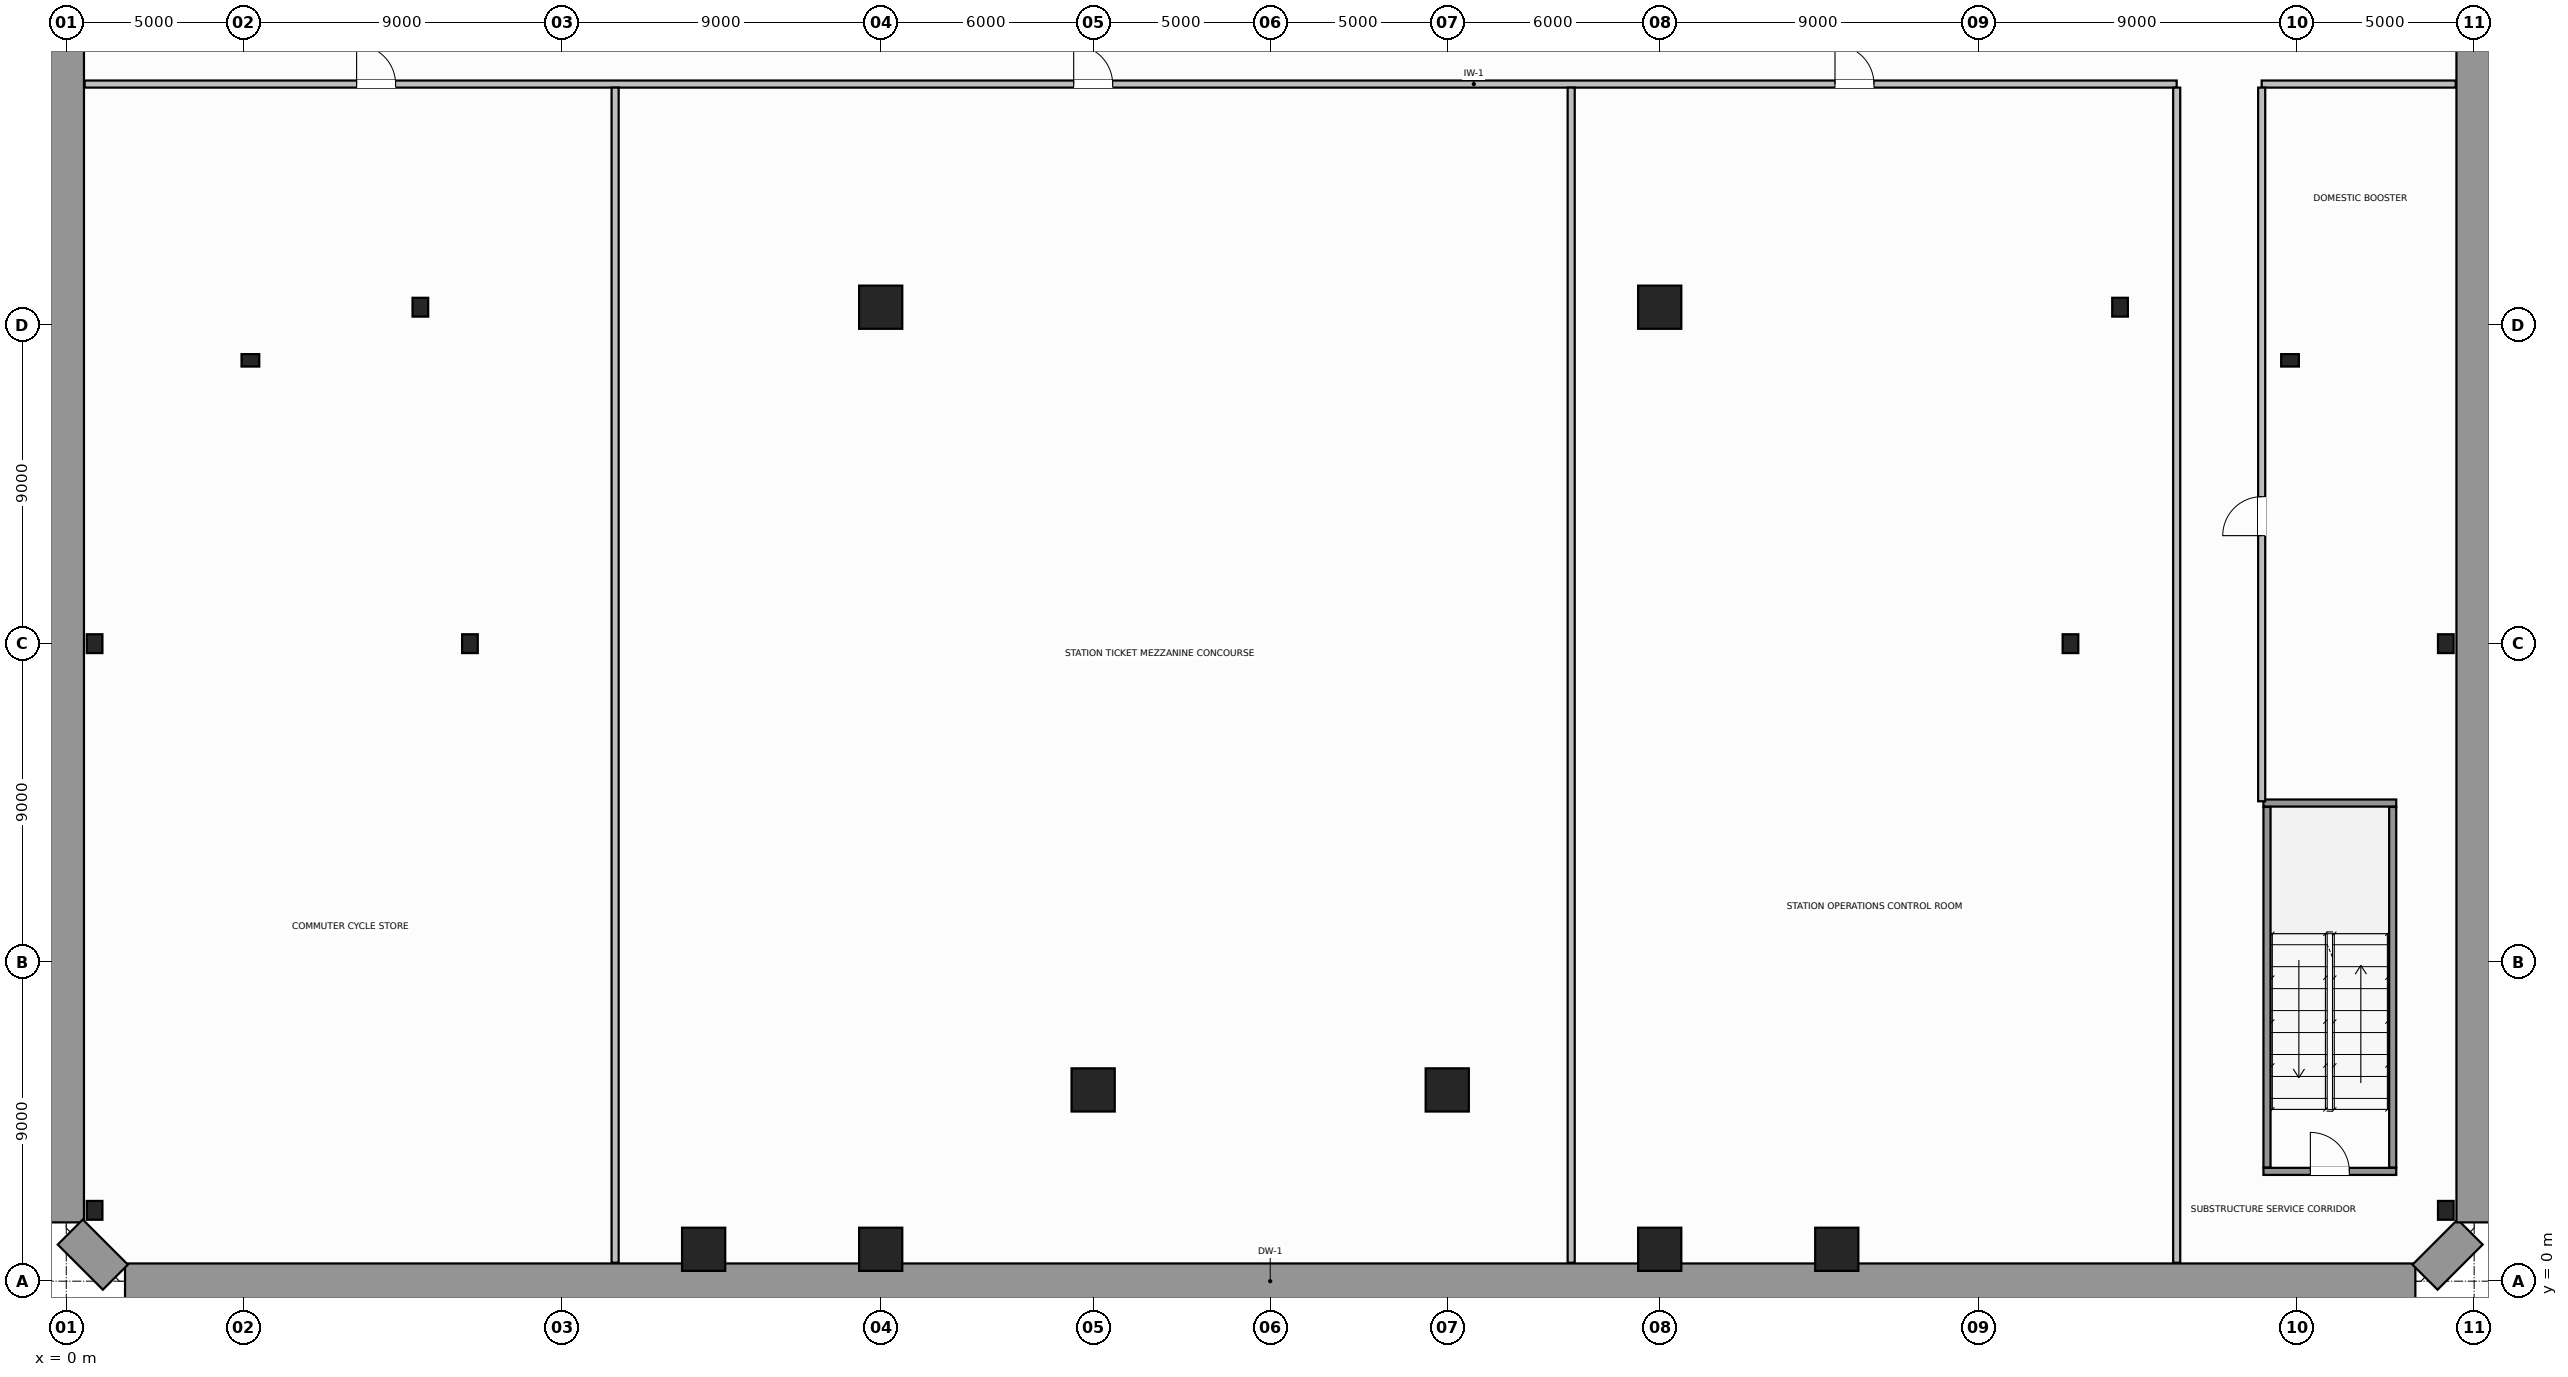
"""IFC4 building model, lengths in metres.
Left out: names, types, materials, properties, quantities, classifications, styles, units other than length and angle.
Written with IfcOpenShell. Run it as: python <this file> out.ifc"""

import sys

from ifc_helpers import new_model, si_unit, direction, frame, frame_2d, origin, origin_2d, place, context, subcontext, project, spatial, rectangle, hollow_circle, i_section, extrude, source, transform, mapped, element, fill, save


model = new_model("IFC4")
c1 = context("Model", 3, precision=1e-05, world=origin(), true_north=direction((0.0, 1.0)))
c2 = subcontext(c1, "Body", "Model", "MODEL_VIEW")
j1 = project(units=[si_unit("LENGTHUNIT", "METRE"), si_unit("PLANEANGLEUNIT", "RADIAN")], contexts=[c1])
p1 = place(None, origin())
s1 = spatial("IfcSite", under=j1, at=p1, CompositionType="ELEMENT")
p2 = place(p1, origin())
s2 = spatial("IfcBuilding", under=s1, at=p2, CompositionType="ELEMENT")
p3 = place(p2, frame((0.0, 0.0, -5.2)))
s3 = spatial("IfcBuildingStorey", under=s2, at=p3, CompositionType="ELEMENT", Elevation=-5.2)
m1 = source(origin(), c2, "Body", "SweptSolid", [
    extrude(hollow_circle(Radius=0.61, WallThickness=0.05, at=origin_2d()), origin(), (0.0, 0.0, 1.0), 5.2),
])
for number, where, z_axis, x_axis in (
    (1, (18.0, 0.9, 0.0), (0.0, 0.0, 1.0), (1.0, 0.0, 0.0)),
    (2, (23.0, 0.9, 0.0), (0.0, 0.0, 1.0), (1.0, 0.0, 0.0)),
    (3, (29.0, 5.4, 0.0), (0.0, 0.0, 1.0), (1.0, 0.0, 0.0)),
    (4, (39.0, 5.4, 0.0), (0.0, 0.0, 1.0), (1.0, 0.0, 0.0)),
    (5, (45.0, 0.9, 0.0), (0.0, 0.0, 1.0), (1.0, 0.0, 0.0)),
    (6, (50.0, 0.9, 0.0), (0.0, 0.0, 1.0), (1.0, 0.0, 0.0)),
):
    element("IfcColumn", number, at=place(p3, frame(where, z_axis=z_axis, x_axis=x_axis)), inside=s3, PredefinedType="COLUMN", context=c2, shape_type="MappedRepresentation", body=[
        mapped(m1, transform((0.0, 0.0, 0.0), scale=1.0)),
    ])
m2 = source(origin(), c2, "Body", "SweptSolid", [
    extrude(i_section(OverallWidth=0.442, OverallDepth=0.531, WebThickness=0.065, FlangeThickness=0.076, FilletRadius=0.015, at=origin_2d()), origin(), (0.0, 0.0, 1.0), 5.2),
])
for number, where, z_axis, x_axis in (
    (7, (0.8, 2.0, 0.0), (0.0, 0.0, 1.0), (1.0, 0.0, 0.0)),
    (8, (0.8, 18.0, 0.0), (0.0, 0.0, 1.0), (1.0, 0.0, 0.0)),
    (9, (67.2, 2.0, 0.0), (0.0, 0.0, 1.0), (1.0, 0.0, 0.0)),
    (10, (67.2, 18.0, 0.0), (0.0, 0.0, 1.0), (1.0, 0.0, 0.0)),
    (11, (10.0, 27.5, 0.0), (0.0, 0.0, 1.0), (1.0, 0.0, 0.0)),
    (12, (11.4, 18.0, 0.0), (0.0, 0.0, 1.0), (1.0, 0.0, 0.0)),
    (13, (58.0, 27.5, 0.0), (0.0, 0.0, 1.0), (1.0, 0.0, 0.0)),
    (14, (56.6, 18.0, 0.0), (0.0, 0.0, 1.0), (1.0, 0.0, 0.0)),
):
    element("IfcColumn", number, at=place(p3, frame(where, z_axis=z_axis, x_axis=x_axis)), inside=s3, PredefinedType="COLUMN", context=c2, shape_type="MappedRepresentation", body=[
        mapped(m2, transform((0.0, 0.0, 0.0), scale=1.0)),
    ])
for number, where, z_axis, x_axis in (
    (15, (23.0, 27.5, 0.0), (0.0, 0.0, 1.0), (1.0, 0.0, 0.0)),
    (16, (45.0, 27.5, 0.0), (0.0, 0.0, 1.0), (1.0, 0.0, 0.0)),
):
    element("IfcColumn", number, at=place(p3, frame(where, z_axis=z_axis, x_axis=x_axis)), inside=s3, PredefinedType="COLUMN", context=c2, shape_type="MappedRepresentation", body=[
        mapped(m1, transform((0.0, 0.0, 0.0), scale=1.0)),
    ])
m3 = source(origin(), c2, "Body", "SweptSolid", [
    extrude(rectangle(XDim=0.5, YDim=0.35, at=origin_2d()), origin(), (0.0, 0.0, 1.0), 4.88),
])
for number, where, z_axis, x_axis in (
    (17, (5.2, 26.0, 0.0), (0.0, 0.0, 1.0), (1.0, 0.0, 0.0)),
    (18, (62.8, 26.0, 0.0), (0.0, 0.0, 1.0), (1.0, 0.0, 0.0)),
):
    element("IfcColumn", number, at=place(p3, frame(where, z_axis=z_axis, x_axis=x_axis)), inside=s3, PredefinedType="PILASTER", context=c2, shape_type="MappedRepresentation", body=[
        mapped(m3, transform((0.0, 0.0, 0.0), scale=1.0)),
    ])
p4 = place(p3, frame((1.66, 0.0, 0.0), z_axis=(0.0, 0.0, 1.0), x_axis=(1.0, 0.0, 0.0)))
e19 = element("IfcWall", 19, at=p4, inside=s3, PredefinedType="STANDARD", context=c2, shape_type="SweptSolid", body=[
    extrude(rectangle(XDim=64.68, YDim=1.0, at=frame_2d((32.34, 0.0))), origin(), (0.0, 0.0, 1.0), 5.2),
])
p5 = place(p3, frame((66.613, 0.113, 0.0), z_axis=(0.0, 0.0, 1.0), x_axis=(0.707106781187, 0.707106781187, 0.0)))
e20 = element("IfcWall", 20, at=p5, inside=s3, PredefinedType="STANDARD", context=c2, shape_type="SweptSolid", body=[
    extrude(rectangle(XDim=1.802, YDim=1.0, at=frame_2d((0.901, 0.0))), origin(), (0.0, 0.0, 1.0), 5.2),
])
for number, where, z_axis, x_axis in (
    (21, (68.0, 1.66, 0.0), (0.0, 0.0, 1.0), (0.0, 1.0, 0.0)),
    (22, (0.0, 50.34, 0.0), (0.0, 0.0, 1.0), (0.0, -1.0, 0.0)),
):
    element("IfcWall", number, at=place(p3, frame(where, z_axis=z_axis, x_axis=x_axis)), inside=s3, PredefinedType="STANDARD", context=c2, shape_type="SweptSolid", body=[
        extrude(rectangle(XDim=48.68, YDim=1.0, at=frame_2d((24.34, 0.0))), origin(), (0.0, 0.0, 1.0), 5.2),
    ])
p6 = place(p3, frame((0.113, 1.387, 0.0), z_axis=(0.0, 0.0, 1.0), x_axis=(0.707106781187, -0.707106781187, 0.0)))
e23 = element("IfcWall", 23, at=p6, inside=s3, PredefinedType="STANDARD", context=c2, shape_type="SweptSolid", body=[
    extrude(rectangle(XDim=1.802, YDim=1.0, at=frame_2d((0.901, 0.0))), origin(), (0.0, 0.0, 1.0), 5.2),
])
p7 = place(p3, frame((62.05, 3.1, 0.0), z_axis=(0.0, 0.0, 1.0), x_axis=(1.0, 0.0, 0.0)))
e24 = element("IfcWall", 24, at=p7, inside=s3, PredefinedType="SOLIDWALL", context=c2, shape_type="SweptSolid", body=[
    extrude(rectangle(XDim=3.75, YDim=0.2, at=frame_2d((1.875, 0.0))), origin(), (0.0, 0.0, 1.0), 5.2),
])
p8 = place(p7, frame((1.325, 0.0, 0.0)))
e25 = element("IfcOpeningElement", 25, at=p8, cuts=e24, PredefinedType="OPENING", context=c2, shape_type="SweptSolid", body=[
    extrude(rectangle(XDim=1.1, YDim=2.15, at=frame_2d((0.55, 1.075))), frame((0.0, 0.11, 0.0), z_axis=(0.0, -1.0, 0.0), x_axis=(1.0, 0.0, 0.0)), (0.0, 0.0, 1.0), 0.22),
])
p9 = place(p3, frame((62.05, 13.5, 0.0), z_axis=(0.0, 0.0, 1.0), x_axis=(1.0, 0.0, 0.0)))
e26 = element("IfcWall", 26, at=p9, inside=s3, PredefinedType="SOLIDWALL", context=c2, shape_type="SweptSolid", body=[
    extrude(rectangle(XDim=3.75, YDim=0.2, at=frame_2d((1.875, 0.0))), origin(), (0.0, 0.0, 1.0), 5.2),
])
for number, where, z_axis, x_axis in (
    (27, (62.15, 3.21, 0.0), (0.0, 0.0, 1.0), (0.0, 1.0, 0.0)),
    (28, (65.7, 3.21, 0.0), (0.0, 0.0, 1.0), (0.0, 1.0, 0.0)),
):
    element("IfcWall", number, at=place(p3, frame(where, z_axis=z_axis, x_axis=x_axis)), inside=s3, PredefinedType="SOLIDWALL", context=c2, shape_type="SweptSolid", body=[
        extrude(rectangle(XDim=10.18, YDim=0.2, at=frame_2d((5.09, 0.0))), origin(), (0.0, 0.0, 1.0), 5.2),
    ])
p10 = place(p3, frame((0.52, 33.8, 0.0), z_axis=(0.0, 0.0, 1.0), x_axis=(1.0, 0.0, 0.0)))
e29 = element("IfcWall", 29, at=p10, inside=s3, PredefinedType="SOLIDWALL", context=c2, shape_type="SweptSolid", body=[
    extrude(rectangle(XDim=59.08, YDim=0.2, at=frame_2d((29.54, 0.0))), origin(), (0.0, 0.0, 1.0), 4.88),
])
p11 = place(p10, frame((7.68, 0.0, 0.0)))
e30 = element("IfcOpeningElement", 30, at=p11, cuts=e29, PredefinedType="OPENING", context=c2, shape_type="SweptSolid", body=[
    extrude(rectangle(XDim=1.1, YDim=2.15, at=frame_2d((0.55, 1.075))), frame((0.0, 0.11, 0.0), z_axis=(0.0, -1.0, 0.0), x_axis=(1.0, 0.0, 0.0)), (0.0, 0.0, 1.0), 0.22),
])
p12 = place(p10, frame((27.93, 0.0, 0.0)))
e31 = element("IfcOpeningElement", 31, at=p12, cuts=e29, PredefinedType="OPENING", context=c2, shape_type="SweptSolid", body=[
    extrude(rectangle(XDim=1.1, YDim=2.15, at=frame_2d((0.55, 1.075))), frame((0.0, 0.11, 0.0), z_axis=(0.0, -1.0, 0.0), x_axis=(1.0, 0.0, 0.0)), (0.0, 0.0, 1.0), 0.22),
])
p13 = place(p10, frame((49.43, 0.0, 0.0)))
e32 = element("IfcOpeningElement", 32, at=p13, cuts=e29, PredefinedType="OPENING", context=c2, shape_type="SweptSolid", body=[
    extrude(rectangle(XDim=1.1, YDim=2.15, at=frame_2d((0.55, 1.075))), frame((0.0, 0.11, 0.0), z_axis=(0.0, -1.0, 0.0), x_axis=(1.0, 0.0, 0.0)), (0.0, 0.0, 1.0), 0.22),
])
p14 = place(p3, frame((62.0, 33.8, 0.0), z_axis=(0.0, 0.0, 1.0), x_axis=(1.0, 0.0, 0.0)))
e33 = element("IfcWall", 33, at=p14, inside=s3, PredefinedType="SOLIDWALL", context=c2, shape_type="SweptSolid", body=[
    extrude(rectangle(XDim=5.48, YDim=0.2, at=frame_2d((2.74, 0.0))), origin(), (0.0, 0.0, 1.0), 4.88),
])
p15 = place(p3, frame((59.6, 0.52, 0.0), z_axis=(0.0, 0.0, 1.0), x_axis=(0.0, 1.0, 0.0)))
e34 = element("IfcWall", 34, at=p15, inside=s3, PredefinedType="SOLIDWALL", context=c2, shape_type="SweptSolid", body=[
    extrude(rectangle(XDim=33.18, YDim=0.2, at=frame_2d((16.59, 0.0))), origin(), (0.0, 0.0, 1.0), 3.96),
])
p16 = place(p3, frame((62.0, 13.55, 0.0), z_axis=(0.0, 0.0, 1.0), x_axis=(0.0, 1.0, 0.0)))
e35 = element("IfcWall", 35, at=p16, inside=s3, PredefinedType="SOLIDWALL", context=c2, shape_type="SweptSolid", body=[
    extrude(rectangle(XDim=20.15, YDim=0.2, at=frame_2d((10.075, 0.0))), origin(), (0.0, 0.0, 1.0), 4.88),
])
p17 = place(p16, frame((7.5, 0.0, 0.0)))
e36 = element("IfcOpeningElement", 36, at=p17, cuts=e35, PredefinedType="OPENING", context=c2, shape_type="SweptSolid", body=[
    extrude(rectangle(XDim=1.1, YDim=2.15, at=frame_2d((0.55, 1.075))), frame((0.0, 0.11, 0.0), z_axis=(0.0, -1.0, 0.0), x_axis=(1.0, 0.0, 0.0)), (0.0, 0.0, 1.0), 0.22),
])
p18 = place(p3, frame((15.5, 0.52, 0.0), z_axis=(0.0, 0.0, 1.0), x_axis=(0.0, 1.0, 0.0)))
e37 = element("IfcWall", 37, at=p18, inside=s3, PredefinedType="SOLIDWALL", context=c2, shape_type="SweptSolid", body=[
    extrude(rectangle(XDim=33.18, YDim=0.2, at=frame_2d((16.59, 0.0))), origin(), (0.0, 0.0, 1.0), 3.96),
])
p19 = place(p3, frame((42.5, 0.52, 0.0), z_axis=(0.0, 0.0, 1.0), x_axis=(0.0, 1.0, 0.0)))
e38 = element("IfcWall", 38, at=p19, inside=s3, PredefinedType="SOLIDWALL", context=c2, shape_type="SweptSolid", body=[
    extrude(rectangle(XDim=33.18, YDim=0.2, at=frame_2d((16.59, 0.0))), origin(), (0.0, 0.0, 1.0), 4.88),
])
m4 = source(origin(), c2, "Body", "SweptSolid", [
    extrude(rectangle(XDim=1.1, YDim=2.15, at=frame_2d((0.55, 1.075))), frame((0.0, 0.025, 0.0), z_axis=(0.0, -1.0, 0.0), x_axis=(1.0, 0.0, 0.0)), (0.0, 0.0, 1.0), 0.05),
])
p20 = place(p8, origin())
e39 = element("IfcDoor", 39, at=p20, inside=s3, OperationType="SINGLE_SWING_RIGHT", PredefinedType="DOOR", context=c2, shape_type="MappedRepresentation", body=[
    mapped(m4, transform((0.0, 0.0, 0.0), scale=1.0)),
])
fill(e25, e39)
p21 = place(p11, origin())
e40 = element("IfcDoor", 40, at=p21, inside=s3, OperationType="SINGLE_SWING_LEFT", PredefinedType="DOOR", context=c2, shape_type="MappedRepresentation", body=[
    mapped(m4, transform((0.0, 0.0, 0.0), scale=1.0)),
])
fill(e30, e40)
p22 = place(p12, origin())
e41 = element("IfcDoor", 41, at=p22, inside=s3, OperationType="SINGLE_SWING_RIGHT", PredefinedType="DOOR", context=c2, shape_type="MappedRepresentation", body=[
    mapped(m4, transform((0.0, 0.0, 0.0), scale=1.0)),
])
fill(e31, e41)
p23 = place(p13, origin())
e42 = element("IfcDoor", 42, at=p23, inside=s3, OperationType="SINGLE_SWING_LEFT", PredefinedType="DOOR", context=c2, shape_type="MappedRepresentation", body=[
    mapped(m4, transform((0.0, 0.0, 0.0), scale=1.0)),
])
fill(e32, e42)
p24 = place(p17, origin())
e43 = element("IfcDoor", 43, at=p24, inside=s3, OperationType="SINGLE_SWING_RIGHT", PredefinedType="DOOR", context=c2, shape_type="MappedRepresentation", body=[
    mapped(m4, transform((0.0, 0.0, 0.0), scale=1.0)),
])
fill(e36, e43)
save(model, sys.argv[1])
